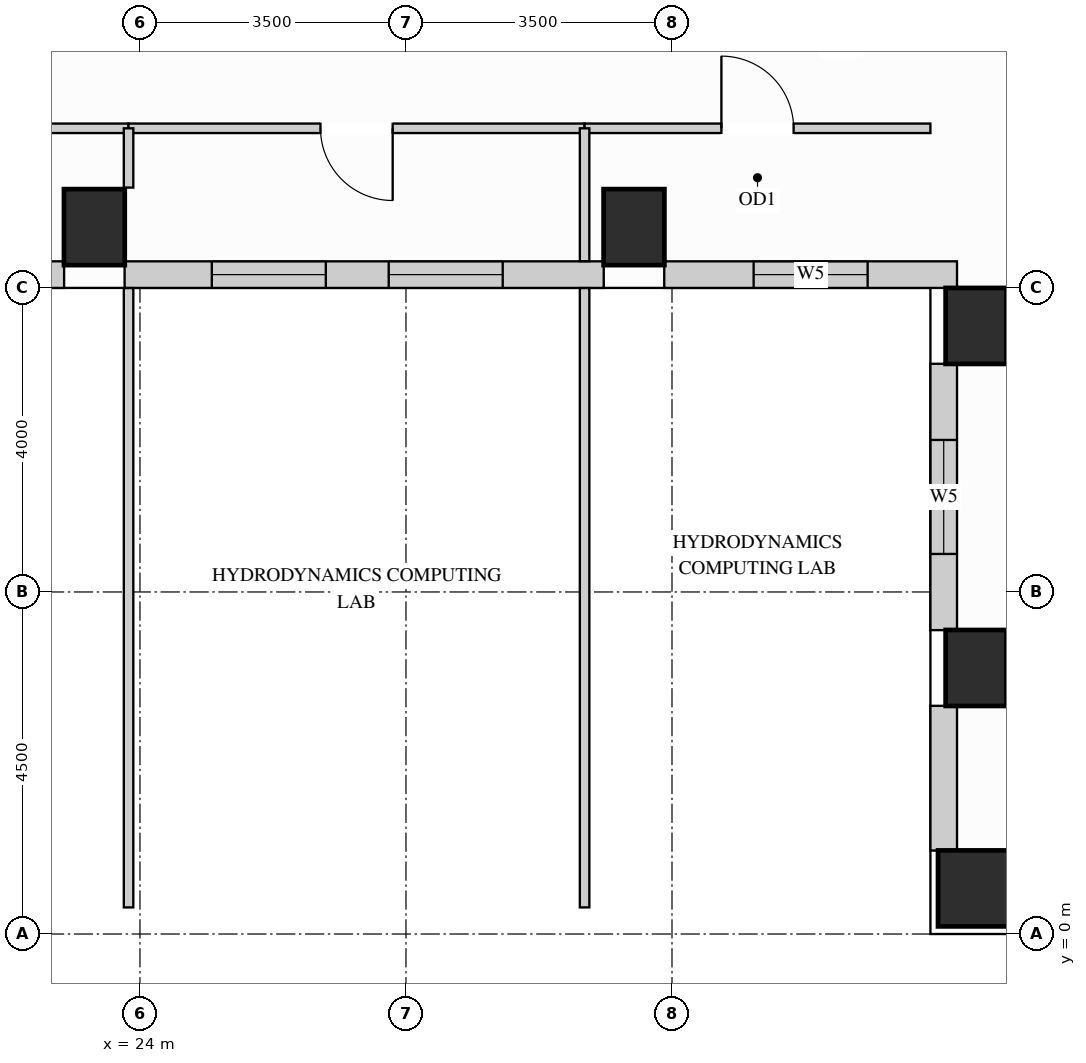
"""IFC4 building model, lengths in metres.
Left out: names, types, materials, properties, quantities, classifications, styles, units other than length and angle.
Written with IfcOpenShell. Run it as: python <this file> out.ifc"""

import sys

from ifc_helpers import new_model, si_unit, direction, frame, frame_2d, origin, origin_2d, place, context, subcontext, project, spatial, rectangle, extrude, source, transform, mapped, element, fill, save


model = new_model("IFC4")
c1 = context("Model", 3, precision=1e-05, world=origin(), true_north=direction((0.0, 1.0)))
c2 = subcontext(c1, "Body", "Model", "MODEL_VIEW")
j1 = project(units=[si_unit("LENGTHUNIT", "METRE"), si_unit("PLANEANGLEUNIT", "RADIAN")], contexts=[c1])
p1 = place(None, origin())
s1 = spatial("IfcSite", under=j1, at=p1, CompositionType="ELEMENT")
p2 = place(p1, origin())
s2 = spatial("IfcBuilding", under=s1, at=p2, CompositionType="ELEMENT")
p3 = place(p2, frame((0.0, 0.0, 186.3)))
s3 = spatial("IfcBuildingStorey", under=s2, at=p3, CompositionType="ELEMENT", Elevation=186.3)
m1 = source(origin(), c2, "Body", "SweptSolid", [
    extrude(rectangle(XDim=0.8, YDim=1.0, at=origin_2d()), origin(), (0.0, 0.0, 1.0), 3.4),
])
for number, where, z_axis, x_axis in (
    (1, (35.0, 3.5, 0.0), (0.0, 0.0, 1.0), (1.0, 0.0, 0.0)),
    (2, (35.0, 8.0, 0.0), (0.0, 0.0, 1.0), (1.0, 0.0, 0.0)),
    (3, (23.4, 9.3, 0.0), (0.0, 0.0, 1.0), (1.0, 0.0, 0.0)),
    (4, (30.5, 9.3, 0.0), (0.0, 0.0, 1.0), (1.0, 0.0, 0.0)),
):
    element("IfcColumn", number, at=place(p3, frame(where, z_axis=z_axis, x_axis=x_axis)), inside=s3, PredefinedType="COLUMN", context=c2, shape_type="MappedRepresentation", body=[
        mapped(m1, transform((0.0, 0.0, 0.0), x_axis=(1.0, 0.0, 0.0), y_axis=(0.0, 1.0, 0.0), z_axis=(0.0, 0.0, 1.0))),
    ])
m2 = source(origin(), c2, "Body", "SweptSolid", [
    extrude(rectangle(XDim=1.0, YDim=1.0, at=origin_2d()), origin(), (0.0, 0.0, 1.0), 3.4),
])
p4 = place(p3, frame((35.0, 0.6, 0.0), z_axis=(0.0, 0.0, 1.0), x_axis=(1.0, 0.0, 0.0)))
e5 = element("IfcColumn", 5, at=p4, inside=s3, PredefinedType="COLUMN", context=c2, shape_type="MappedRepresentation", body=[
    mapped(m2, transform((0.0, 0.0, 0.0), x_axis=(1.0, 0.0, 0.0), y_axis=(0.0, 1.0, 0.0), z_axis=(0.0, 0.0, 1.0))),
])
p5 = place(p3, frame((19.398, 8.675, 0.0), z_axis=(0.0, 0.0, 1.0), x_axis=(1.0, 0.0, 0.0)))
e6 = element("IfcWall", 6, at=p5, inside=s3, PredefinedType="SOLIDWALL", context=c2, shape_type="SweptSolid", body=[
    extrude(rectangle(XDim=3.604, YDim=0.35, at=frame_2d((1.802, 0.0))), origin(), (0.0, 0.0, 1.0), 3.385),
])
p6 = place(p5, frame((1.067, 0.0, 0.78)))
e7 = element("IfcOpeningElement", 7, at=p6, cuts=e6, PredefinedType="OPENING", context=c2, shape_type="SweptSolid", body=[
    extrude(rectangle(XDim=1.5, YDim=2.0, at=frame_2d((0.75, 1.0))), frame((0.0, 0.185, 0.0), z_axis=(0.0, -1.0, 0.0), x_axis=(1.0, 0.0, 0.0)), (0.0, 0.0, 1.0), 0.37),
])
p7 = place(p3, frame((23.798, 8.675, 0.0), z_axis=(0.0, 0.0, 1.0), x_axis=(1.0, 0.0, 0.0)))
e8 = element("IfcWall", 8, at=p7, inside=s3, PredefinedType="SOLIDWALL", context=c2, shape_type="SweptSolid", body=[
    extrude(rectangle(XDim=6.304, YDim=0.35, at=frame_2d((3.152, 0.0))), origin(), (0.0, 0.0, 1.0), 3.385),
])
p8 = place(p7, frame((1.147, 0.0, 0.78)))
e9 = element("IfcOpeningElement", 9, at=p8, cuts=e8, PredefinedType="OPENING", context=c2, shape_type="SweptSolid", body=[
    extrude(rectangle(XDim=1.5, YDim=2.0, at=frame_2d((0.75, 1.0))), frame((0.0, 0.185, 0.0), z_axis=(0.0, -1.0, 0.0), x_axis=(1.0, 0.0, 0.0)), (0.0, 0.0, 1.0), 0.37),
])
p9 = place(p7, frame((3.475, 0.0, 0.78)))
e10 = element("IfcOpeningElement", 10, at=p9, cuts=e8, PredefinedType="OPENING", context=c2, shape_type="SweptSolid", body=[
    extrude(rectangle(XDim=1.5, YDim=2.0, at=frame_2d((0.75, 1.0))), frame((0.0, 0.185, 0.0), z_axis=(0.0, -1.0, 0.0), x_axis=(1.0, 0.0, 0.0)), (0.0, 0.0, 1.0), 0.37),
])
p10 = place(p3, frame((30.898, 8.675, 0.0), z_axis=(0.0, 0.0, 1.0), x_axis=(1.0, 0.0, 0.0)))
e11 = element("IfcWall", 11, at=p10, inside=s3, PredefinedType="SOLIDWALL", context=c2, shape_type="SweptSolid", body=[
    extrude(rectangle(XDim=3.852, YDim=0.35, at=frame_2d((1.926, 0.0))), origin(), (0.0, 0.0, 1.0), 3.385),
])
p11 = place(p10, frame((1.176, 0.0, 0.78)))
e12 = element("IfcOpeningElement", 12, at=p11, cuts=e11, PredefinedType="OPENING", context=c2, shape_type="SweptSolid", body=[
    extrude(rectangle(XDim=1.5, YDim=2.0, at=frame_2d((0.75, 1.0))), frame((0.0, 0.185, 0.0), z_axis=(0.0, -1.0, 0.0), x_axis=(1.0, 0.0, 0.0)), (0.0, 0.0, 1.0), 0.37),
])
p12 = place(p3, frame((34.575, 7.502, 0.0), z_axis=(0.0, 0.0, 1.0), x_axis=(0.0, -1.0, 0.0)))
e13 = element("IfcWall", 13, at=p12, inside=s3, PredefinedType="SOLIDWALL", context=c2, shape_type="SweptSolid", body=[
    extrude(rectangle(XDim=3.504, YDim=0.35, at=frame_2d((1.752, 0.0))), origin(), (0.0, 0.0, 1.0), 2.612),
])
p13 = place(p12, frame((1.002, 0.0, 0.78)))
e14 = element("IfcOpeningElement", 14, at=p13, cuts=e13, PredefinedType="OPENING", context=c2, shape_type="SweptSolid", body=[
    extrude(rectangle(XDim=1.5, YDim=1.652, at=frame_2d((0.75, 0.826))), frame((0.0, 0.185, 0.0), z_axis=(0.0, -1.0, 0.0), x_axis=(1.0, 0.0, 0.0)), (0.0, 0.0, 1.0), 0.37),
])
m3 = source(origin(), c2, "Body", "SweptSolid", [
    extrude(rectangle(XDim=1.904, YDim=0.35, at=frame_2d((0.952, 0.0))), origin(), (0.0, 0.0, 1.0), 2.612),
])
p14 = place(p3, frame((34.575, 3.002, 0.0), z_axis=(0.0, 0.0, 1.0), x_axis=(0.0, -1.0, 0.0)))
e15 = element("IfcWall", 15, at=p14, inside=s3, PredefinedType="SOLIDWALL", context=c2, shape_type="MappedRepresentation", body=[
    mapped(m3, transform((0.0, 0.0, 0.0), x_axis=(1.0, 0.0, 0.0), y_axis=(0.0, 1.0, 0.0), z_axis=(0.0, 0.0, 1.0))),
])
p15 = place(p3, frame((19.5, 10.6, 0.0), z_axis=(0.0, 0.0, 1.0), x_axis=(1.0, 0.0, 0.0)))
e16 = element("IfcWall", 16, at=p15, inside=s3, PredefinedType="PARTITIONING", context=c2, shape_type="SweptSolid", body=[
    extrude(rectangle(XDim=4.35, YDim=0.125, at=frame_2d((2.175, 0.0))), origin(), (0.0, 0.0, 1.0), 3.385),
])
p16 = place(p15, frame((1.7, 0.0, 0.0)))
e17 = element("IfcOpeningElement", 17, at=p16, cuts=e16, PredefinedType="OPENING", context=c2, shape_type="SweptSolid", body=[
    extrude(rectangle(XDim=0.95, YDim=2.15, at=frame_2d((0.475, 1.075))), frame((0.0, 0.073, 0.0), z_axis=(0.0, -1.0, 0.0), x_axis=(1.0, 0.0, 0.0)), (0.0, 0.0, 1.0), 0.145),
])
p17 = place(p3, frame((23.85, 10.6, 0.0), z_axis=(0.0, 0.0, 1.0), x_axis=(1.0, 0.0, 0.0)))
e18 = element("IfcWall", 18, at=p17, inside=s3, PredefinedType="PARTITIONING", context=c2, shape_type="SweptSolid", body=[
    extrude(rectangle(XDim=6.0, YDim=0.125, at=frame_2d((3.0, 0.0))), origin(), (0.0, 0.0, 1.0), 3.385),
])
p18 = place(p17, frame((2.525, 0.0, 0.0)))
e19 = element("IfcOpeningElement", 19, at=p18, cuts=e18, PredefinedType="OPENING", context=c2, shape_type="SweptSolid", body=[
    extrude(rectangle(XDim=0.95, YDim=2.15, at=frame_2d((0.475, 1.075))), frame((0.0, 0.073, 0.0), z_axis=(0.0, -1.0, 0.0), x_axis=(1.0, 0.0, 0.0)), (0.0, 0.0, 1.0), 0.145),
])
p19 = place(p3, frame((29.85, 10.6, 0.0), z_axis=(0.0, 0.0, 1.0), x_axis=(1.0, 0.0, 0.0)))
e20 = element("IfcWall", 20, at=p19, inside=s3, PredefinedType="PARTITIONING", context=c2, shape_type="SweptSolid", body=[
    extrude(rectangle(XDim=4.55, YDim=0.125, at=frame_2d((2.275, 0.0))), origin(), (0.0, 0.0, 1.0), 3.385),
])
p20 = place(p19, frame((1.8, 0.0, 0.0)))
e21 = element("IfcOpeningElement", 21, at=p20, cuts=e20, PredefinedType="OPENING", context=c2, shape_type="SweptSolid", body=[
    extrude(rectangle(XDim=0.95, YDim=2.15, at=frame_2d((0.475, 1.075))), frame((0.0, 0.073, 0.0), z_axis=(0.0, -1.0, 0.0), x_axis=(1.0, 0.0, 0.0)), (0.0, 0.0, 1.0), 0.145),
])
m4 = source(origin(), c2, "Body", "SweptSolid", [
    extrude(rectangle(XDim=8.148, YDim=0.125, at=frame_2d((4.074, 0.0))), origin(), (0.0, 0.0, 1.0), 3.385),
])
p21 = place(p3, frame((23.85, 0.35, 0.0), z_axis=(0.0, 0.0, 1.0), x_axis=(0.0, 1.0, 0.0)))
e22 = element("IfcWall", 22, at=p21, inside=s3, PredefinedType="PARTITIONING", context=c2, shape_type="MappedRepresentation", body=[
    mapped(m4, transform((0.0, 0.0, 0.0), x_axis=(1.0, 0.0, 0.0), y_axis=(0.0, 1.0, 0.0), z_axis=(0.0, 0.0, 1.0))),
])
m5 = source(origin(), c2, "Body", "SweptSolid", [
    extrude(rectangle(XDim=0.78, YDim=0.125, at=frame_2d((0.39, 0.0))), origin(), (0.0, 0.0, 1.0), 3.385),
])
p22 = place(p3, frame((23.85, 9.82, 0.0), z_axis=(0.0, 0.0, 1.0), x_axis=(0.0, 1.0, 0.0)))
e23 = element("IfcWall", 23, at=p22, inside=s3, PredefinedType="PARTITIONING", context=c2, shape_type="MappedRepresentation", body=[
    mapped(m5, transform((0.0, 0.0, 0.0), x_axis=(1.0, 0.0, 0.0), y_axis=(0.0, 1.0, 0.0), z_axis=(0.0, 0.0, 1.0))),
])
p23 = place(p3, frame((29.85, 0.35, 0.0), z_axis=(0.0, 0.0, 1.0), x_axis=(0.0, 1.0, 0.0)))
e24 = element("IfcWall", 24, at=p23, inside=s3, PredefinedType="PARTITIONING", context=c2, shape_type="MappedRepresentation", body=[
    mapped(m4, transform((0.0, 0.0, 0.0), x_axis=(1.0, 0.0, 0.0), y_axis=(0.0, 1.0, 0.0), z_axis=(0.0, 0.0, 1.0))),
])
m6 = source(origin(), c2, "Body", "SweptSolid", [
    extrude(rectangle(XDim=1.748, YDim=0.125, at=frame_2d((0.874, 0.0))), origin(), (0.0, 0.0, 1.0), 3.385),
])
p24 = place(p3, frame((29.85, 8.852, 0.0), z_axis=(0.0, 0.0, 1.0), x_axis=(0.0, 1.0, 0.0)))
e25 = element("IfcWall", 25, at=p24, inside=s3, PredefinedType="PARTITIONING", context=c2, shape_type="MappedRepresentation", body=[
    mapped(m6, transform((0.0, 0.0, 0.0), x_axis=(1.0, 0.0, 0.0), y_axis=(0.0, 1.0, 0.0), z_axis=(0.0, 0.0, 1.0))),
])
m7 = source(origin(), c2, "Body", "SweptSolid", [
    extrude(rectangle(XDim=0.95, YDim=2.15, at=frame_2d((0.475, 1.075))), frame((0.0, 0.025, 0.0), z_axis=(0.0, -1.0, 0.0), x_axis=(1.0, 0.0, 0.0)), (0.0, 0.0, 1.0), 0.05),
])
p25 = place(p18, origin())
e26 = element("IfcDoor", 26, at=p25, inside=s3, OperationType="SINGLE_SWING_RIGHT", PredefinedType="DOOR", context=c2, shape_type="MappedRepresentation", body=[
    mapped(m7, transform((0.0, 0.0, 0.0), x_axis=(1.0, 0.0, 0.0), y_axis=(0.0, 1.0, 0.0), z_axis=(0.0, 0.0, 1.0))),
])
fill(e19, e26)
p26 = place(p20, origin())
e27 = element("IfcDoor", 27, at=p26, inside=s3, OperationType="SINGLE_SWING_LEFT", PredefinedType="DOOR", context=c2, shape_type="MappedRepresentation", body=[
    mapped(m7, transform((0.0, 0.0, 0.0), x_axis=(1.0, 0.0, 0.0), y_axis=(0.0, 1.0, 0.0), z_axis=(0.0, 0.0, 1.0))),
])
fill(e21, e27)
m8 = source(origin(), c2, "Body", "SweptSolid", [
    extrude(rectangle(XDim=1.5, YDim=2.0, at=frame_2d((0.75, 1.0))), frame((0.0, 0.03, 0.0), z_axis=(0.0, -1.0, 0.0), x_axis=(1.0, 0.0, 0.0)), (0.0, 0.0, 1.0), 0.06),
])
p27 = place(p8, origin())
e28 = element("IfcWindow", 28, at=p27, inside=s3, PartitioningType="SINGLE_PANEL", PredefinedType="WINDOW", context=c2, shape_type="MappedRepresentation", body=[
    mapped(m8, transform((0.0, 0.0, 0.0), x_axis=(1.0, 0.0, 0.0), y_axis=(0.0, 1.0, 0.0), z_axis=(0.0, 0.0, 1.0))),
])
fill(e9, e28)
p28 = place(p9, origin())
e29 = element("IfcWindow", 29, at=p28, inside=s3, PartitioningType="SINGLE_PANEL", PredefinedType="WINDOW", context=c2, shape_type="MappedRepresentation", body=[
    mapped(m8, transform((0.0, 0.0, 0.0), x_axis=(1.0, 0.0, 0.0), y_axis=(0.0, 1.0, 0.0), z_axis=(0.0, 0.0, 1.0))),
])
fill(e10, e29)
p29 = place(p11, origin())
e30 = element("IfcWindow", 30, at=p29, inside=s3, PartitioningType="SINGLE_PANEL", PredefinedType="WINDOW", context=c2, shape_type="MappedRepresentation", body=[
    mapped(m8, transform((0.0, 0.0, 0.0), x_axis=(1.0, 0.0, 0.0), y_axis=(0.0, 1.0, 0.0), z_axis=(0.0, 0.0, 1.0))),
])
fill(e12, e30)
m9 = source(origin(), c2, "Body", "SweptSolid", [
    extrude(rectangle(XDim=1.5, YDim=1.652, at=frame_2d((0.75, 0.826))), frame((0.0, 0.03, 0.0), z_axis=(0.0, -1.0, 0.0), x_axis=(1.0, 0.0, 0.0)), (0.0, 0.0, 1.0), 0.06),
])
p30 = place(p13, origin())
e31 = element("IfcWindow", 31, at=p30, inside=s3, PartitioningType="SINGLE_PANEL", PredefinedType="WINDOW", context=c2, shape_type="MappedRepresentation", body=[
    mapped(m9, transform((0.0, 0.0, 0.0), x_axis=(1.0, 0.0, 0.0), y_axis=(0.0, 1.0, 0.0), z_axis=(0.0, 0.0, 1.0))),
])
fill(e14, e31)
save(model, sys.argv[1])
